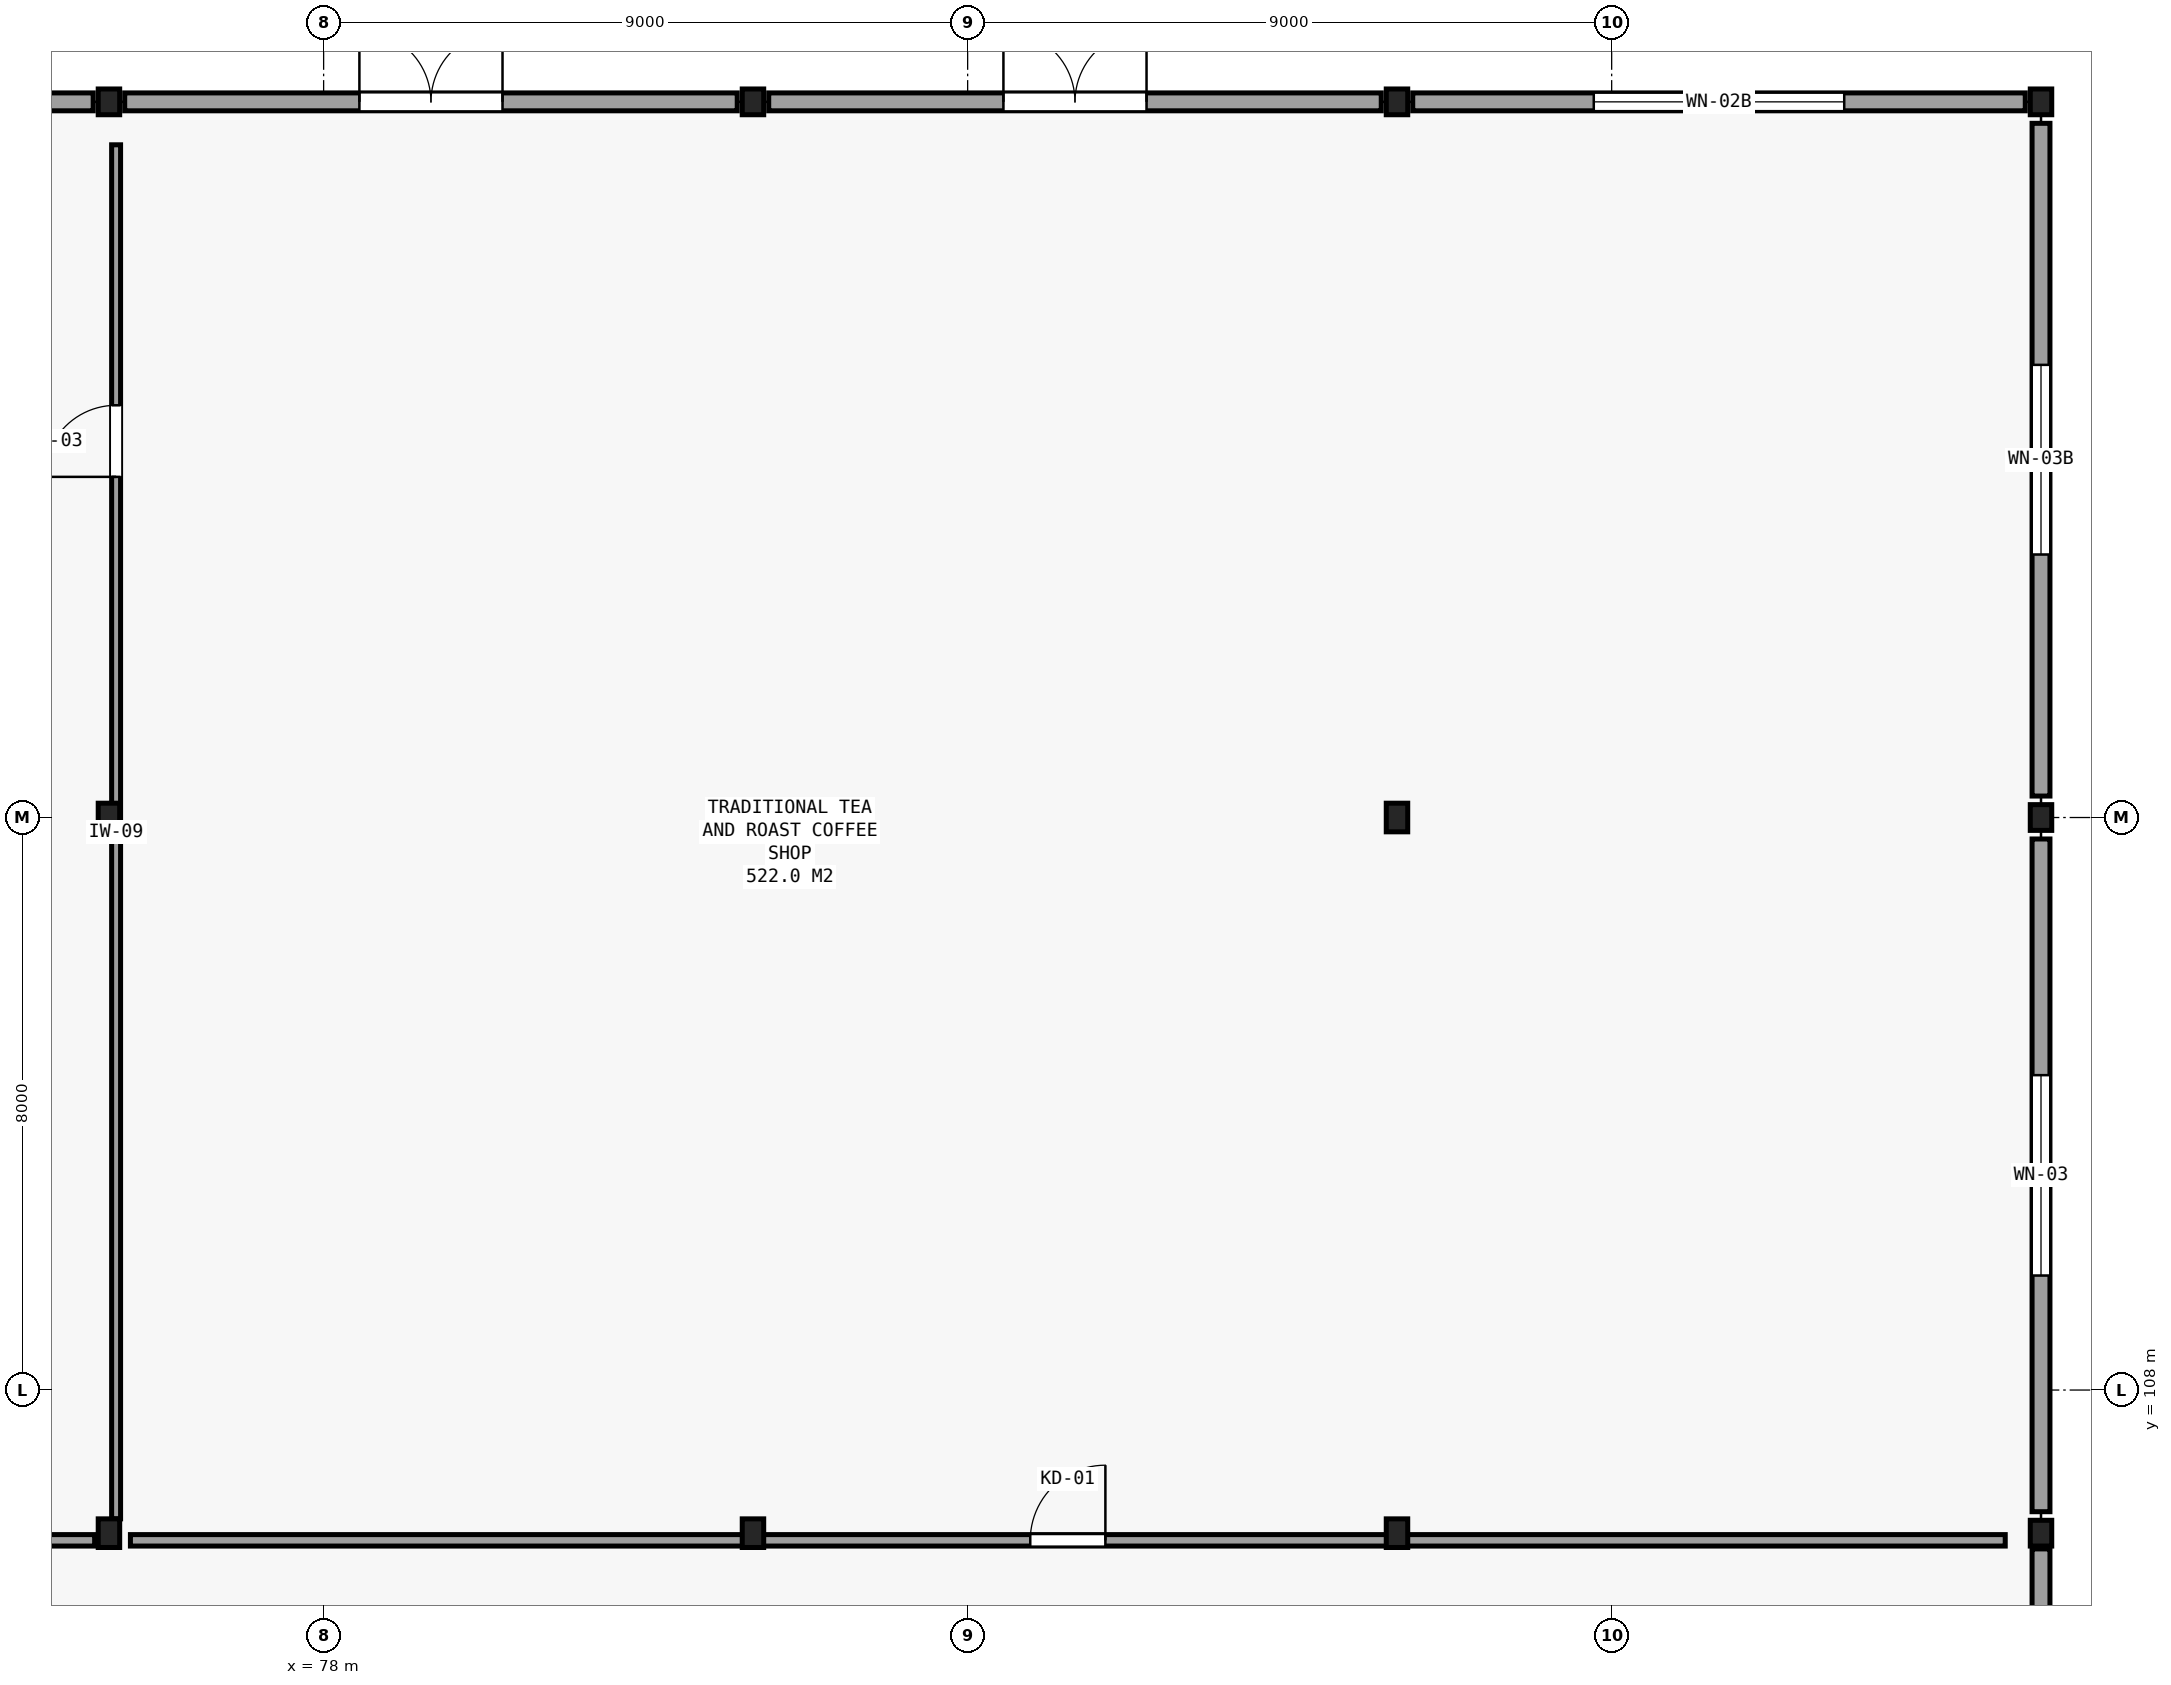
"""IFC4 building model, lengths in metres.
Left out: names, types, materials, properties, quantities, classifications, styles, units other than length and angle.
Written with IfcOpenShell. Run it as: python <this file> out.ifc"""

import sys

from ifc_helpers import new_model, si_unit, direction, frame, frame_2d, origin, origin_2d, place, context, subcontext, project, spatial, rectangle, i_section, extrude, element, fill, save


model = new_model("IFC4")
c1 = context("Model", 3, precision=1e-05, world=origin(), true_north=direction((0.0, 1.0)))
c2 = subcontext(c1, "Body", "Model", "MODEL_VIEW")
j1 = project(units=[si_unit("LENGTHUNIT", "METRE"), si_unit("PLANEANGLEUNIT", "RADIAN")], contexts=[c1])
p1 = place(None, origin())
s1 = spatial("IfcSite", under=j1, at=p1, CompositionType="ELEMENT")
p2 = place(p1, origin())
s2 = spatial("IfcBuilding", under=s1, at=p2, CompositionType="ELEMENT")
p3 = place(p2, origin())
s3 = spatial("IfcBuildingStorey", under=s2, at=p3, CompositionType="ELEMENT", Elevation=0.0)
for number, where, z_axis, x_axis in (
    (1, (75.0, 106.0, 0.0), (0.0, 0.0, 1.0), (1.0, 0.0, 0.0)),
    (2, (75.0, 116.0, 0.0), (0.0, 0.0, 1.0), (1.0, 0.0, 0.0)),
):
    element("IfcColumn", number, at=place(p3, frame(where, z_axis=z_axis, x_axis=x_axis)), inside=s3, PredefinedType="COLUMN", context=c2, shape_type="SweptSolid", body=[
        extrude(i_section(OverallWidth=0.3, OverallDepth=0.4, WebThickness=0.013, FlangeThickness=0.024, FilletRadius=0.027, at=origin_2d()), origin(), (0.0, 0.0, 1.0), 5.4),
    ])
p4 = place(p3, frame((75.0, 126.0, 0.0), z_axis=(0.0, 0.0, 1.0), x_axis=(1.0, 0.0, 0.0)))
e3 = element("IfcColumn", 3, at=p4, inside=s3, PredefinedType="COLUMN", context=c2, shape_type="SweptSolid", body=[
    extrude(i_section(OverallWidth=0.3, OverallDepth=0.36, WebThickness=0.012, FlangeThickness=0.022, FilletRadius=0.027, at=origin_2d()), origin(), (0.0, 0.0, 1.0), 5.4),
])
for number, where, z_axis, x_axis in (
    (4, (84.0, 106.0, 0.0), (0.0, 0.0, 1.0), (1.0, 0.0, 0.0)),
    (5, (84.0, 116.0, 0.0), (0.0, 0.0, 1.0), (1.0, 0.0, 0.0)),
):
    element("IfcColumn", number, at=place(p3, frame(where, z_axis=z_axis, x_axis=x_axis)), inside=s3, PredefinedType="COLUMN", context=c2, shape_type="SweptSolid", body=[
        extrude(i_section(OverallWidth=0.3, OverallDepth=0.4, WebThickness=0.013, FlangeThickness=0.024, FilletRadius=0.027, at=origin_2d()), origin(), (0.0, 0.0, 1.0), 5.4),
    ])
p5 = place(p3, frame((84.0, 126.0, 0.0), z_axis=(0.0, 0.0, 1.0), x_axis=(1.0, 0.0, 0.0)))
e6 = element("IfcColumn", 6, at=p5, inside=s3, PredefinedType="COLUMN", context=c2, shape_type="SweptSolid", body=[
    extrude(i_section(OverallWidth=0.3, OverallDepth=0.36, WebThickness=0.012, FlangeThickness=0.022, FilletRadius=0.027, at=origin_2d()), origin(), (0.0, 0.0, 1.0), 5.4),
])
for number, where, z_axis, x_axis in (
    (7, (93.0, 106.0, 0.0), (0.0, 0.0, 1.0), (1.0, 0.0, 0.0)),
    (8, (93.0, 116.0, 0.0), (0.0, 0.0, 1.0), (1.0, 0.0, 0.0)),
):
    element("IfcColumn", number, at=place(p3, frame(where, z_axis=z_axis, x_axis=x_axis)), inside=s3, PredefinedType="COLUMN", context=c2, shape_type="SweptSolid", body=[
        extrude(i_section(OverallWidth=0.3, OverallDepth=0.4, WebThickness=0.013, FlangeThickness=0.024, FilletRadius=0.027, at=origin_2d()), origin(), (0.0, 0.0, 1.0), 5.4),
    ])
for number, where, z_axis, x_axis in (
    (9, (93.0, 126.0, 0.0), (0.0, 0.0, 1.0), (1.0, 0.0, 0.0)),
    (10, (102.0, 106.0, 0.0), (0.0, 0.0, 1.0), (1.0, 0.0, 0.0)),
    (11, (102.0, 116.0, 0.0), (0.0, 0.0, 1.0), (1.0, 0.0, 0.0)),
    (12, (102.0, 126.0, 0.0), (0.0, 0.0, 1.0), (1.0, 0.0, 0.0)),
):
    element("IfcColumn", number, at=place(p3, frame(where, z_axis=z_axis, x_axis=x_axis)), inside=s3, PredefinedType="COLUMN", context=c2, shape_type="SweptSolid", body=[
        extrude(i_section(OverallWidth=0.3, OverallDepth=0.36, WebThickness=0.012, FlangeThickness=0.022, FilletRadius=0.027, at=origin_2d()), origin(), (0.0, 0.0, 1.0), 5.4),
    ])
p6 = place(p3, frame((66.22, 126.0, 0.0), z_axis=(0.0, 0.0, 1.0), x_axis=(1.0, 0.0, 0.0)))
e13 = element("IfcWall", 13, at=p6, inside=s3, PredefinedType="SOLIDWALL", context=c2, shape_type="SweptSolid", body=[
    extrude(rectangle(XDim=8.56, YDim=0.25, at=frame_2d((4.28, 0.0))), origin(), (0.0, 0.0, 1.0), 4.61),
])
p7 = place(p6, frame((2.68, 0.0, 0.9)))
e14 = element("IfcOpeningElement", 14, at=p7, cuts=e13, PredefinedType="OPENING", context=c2, shape_type="SweptSolid", body=[
    extrude(rectangle(XDim=3.2, YDim=2.2, at=frame_2d((1.6, 1.1))), frame((0.0, 0.135, 0.0), z_axis=(0.0, -1.0, 0.0), x_axis=(1.0, 0.0, 0.0)), (0.0, 0.0, 1.0), 0.27),
])
p8 = place(p3, frame((75.22, 126.0, 0.0), z_axis=(0.0, 0.0, 1.0), x_axis=(1.0, 0.0, 0.0)))
e15 = element("IfcWall", 15, at=p8, inside=s3, PredefinedType="SOLIDWALL", context=c2, shape_type="SweptSolid", body=[
    extrude(rectangle(XDim=8.56, YDim=0.25, at=frame_2d((4.28, 0.0))), origin(), (0.0, 0.0, 1.0), 4.61),
])
p9 = place(p8, frame((3.28, 0.0, 0.0)))
e16 = element("IfcOpeningElement", 16, at=p9, cuts=e15, PredefinedType="OPENING", context=c2, shape_type="SweptSolid", body=[
    extrude(rectangle(XDim=2.0, YDim=2.3, at=frame_2d((1.0, 1.15))), frame((0.0, 0.135, 0.0), z_axis=(0.0, -1.0, 0.0), x_axis=(1.0, 0.0, 0.0)), (0.0, 0.0, 1.0), 0.27),
])
p10 = place(p3, frame((84.22, 126.0, 0.0), z_axis=(0.0, 0.0, 1.0), x_axis=(1.0, 0.0, 0.0)))
e17 = element("IfcWall", 17, at=p10, inside=s3, PredefinedType="SOLIDWALL", context=c2, shape_type="SweptSolid", body=[
    extrude(rectangle(XDim=8.56, YDim=0.25, at=frame_2d((4.28, 0.0))), origin(), (0.0, 0.0, 1.0), 4.61),
])
p11 = place(p10, frame((3.28, 0.0, 0.0)))
e18 = element("IfcOpeningElement", 18, at=p11, cuts=e17, PredefinedType="OPENING", context=c2, shape_type="SweptSolid", body=[
    extrude(rectangle(XDim=2.0, YDim=2.3, at=frame_2d((1.0, 1.15))), frame((0.0, 0.135, 0.0), z_axis=(0.0, -1.0, 0.0), x_axis=(1.0, 0.0, 0.0)), (0.0, 0.0, 1.0), 0.27),
])
p12 = place(p3, frame((93.22, 126.0, 0.0), z_axis=(0.0, 0.0, 1.0), x_axis=(1.0, 0.0, 0.0)))
e19 = element("IfcWall", 19, at=p12, inside=s3, PredefinedType="SOLIDWALL", context=c2, shape_type="SweptSolid", body=[
    extrude(rectangle(XDim=8.56, YDim=0.25, at=frame_2d((4.28, 0.0))), origin(), (0.0, 0.0, 1.0), 4.61),
])
p13 = place(p12, frame((2.53, 0.0, 0.9)))
e20 = element("IfcOpeningElement", 20, at=p13, cuts=e19, PredefinedType="OPENING", context=c2, shape_type="SweptSolid", body=[
    extrude(rectangle(XDim=3.5, YDim=2.25, at=frame_2d((1.75, 1.125))), frame((0.0, 0.135, 0.0), z_axis=(0.0, -1.0, 0.0), x_axis=(1.0, 0.0, 0.0)), (0.0, 0.0, 1.0), 0.27),
])
p14 = place(p3, frame((102.0, 105.78, 0.0), z_axis=(0.0, 0.0, 1.0), x_axis=(0.0, -1.0, 0.0)))
e21 = element("IfcWall", 21, at=p14, inside=s3, PredefinedType="SOLIDWALL", context=c2, shape_type="SweptSolid", body=[
    extrude(rectangle(XDim=9.56, YDim=0.25, at=frame_2d((4.78, 0.0))), origin(), (0.0, 0.0, 1.0), 4.71),
])
p15 = place(p14, frame((3.18, 0.0, 0.9)))
e22 = element("IfcOpeningElement", 22, at=p15, cuts=e21, PredefinedType="OPENING", context=c2, shape_type="SweptSolid", body=[
    extrude(rectangle(XDim=3.2, YDim=2.2, at=frame_2d((1.6, 1.1))), frame((0.0, 0.135, 0.0), z_axis=(0.0, -1.0, 0.0), x_axis=(1.0, 0.0, 0.0)), (0.0, 0.0, 1.0), 0.27),
])
p16 = place(p3, frame((102.0, 115.7, 0.0), z_axis=(0.0, 0.0, 1.0), x_axis=(0.0, -1.0, 0.0)))
e23 = element("IfcWall", 23, at=p16, inside=s3, PredefinedType="SOLIDWALL", context=c2, shape_type="SweptSolid", body=[
    extrude(rectangle(XDim=9.4, YDim=0.25, at=frame_2d((4.7, 0.0))), origin(), (0.0, 0.0, 1.0), 4.71),
])
p17 = place(p16, frame((3.3, 0.0, 0.9)))
e24 = element("IfcOpeningElement", 24, at=p17, cuts=e23, PredefinedType="OPENING", context=c2, shape_type="SweptSolid", body=[
    extrude(rectangle(XDim=2.8, YDim=2.1, at=frame_2d((1.4, 1.05))), frame((0.0, 0.135, 0.0), z_axis=(0.0, -1.0, 0.0), x_axis=(1.0, 0.0, 0.0)), (0.0, 0.0, 1.0), 0.27),
])
p18 = place(p3, frame((102.0, 125.7, 0.0), z_axis=(0.0, 0.0, 1.0), x_axis=(0.0, -1.0, 0.0)))
e25 = element("IfcWall", 25, at=p18, inside=s3, PredefinedType="SOLIDWALL", context=c2, shape_type="SweptSolid", body=[
    extrude(rectangle(XDim=9.4, YDim=0.25, at=frame_2d((4.7, 0.0))), origin(), (0.0, 0.0, 1.0), 4.71),
])
p19 = place(p18, frame((3.375, 0.0, 0.9)))
e26 = element("IfcOpeningElement", 26, at=p19, cuts=e25, PredefinedType="OPENING", context=c2, shape_type="SweptSolid", body=[
    extrude(rectangle(XDim=2.65, YDim=2.05, at=frame_2d((1.325, 1.025))), frame((0.0, 0.135, 0.0), z_axis=(0.0, -1.0, 0.0), x_axis=(1.0, 0.0, 0.0)), (0.0, 0.0, 1.0), 0.27),
])
p20 = place(p3, frame((48.3, 105.9, 0.0), z_axis=(0.0, 0.0, 1.0), x_axis=(1.0, 0.0, 0.0)))
e27 = element("IfcWall", 27, at=p20, inside=s3, PredefinedType="PARTITIONING", context=c2, shape_type="SweptSolid", body=[
    extrude(rectangle(XDim=26.5, YDim=0.16, at=frame_2d((13.25, 0.0))), origin(), (0.0, 0.0, 1.0), 4.61),
])
p21 = place(p20, frame((12.725, 0.0, 0.0)))
e28 = element("IfcOpeningElement", 28, at=p21, cuts=e27, PredefinedType="OPENING", context=c2, shape_type="SweptSolid", body=[
    extrude(rectangle(XDim=1.05, YDim=2.15, at=frame_2d((0.525, 1.075))), frame((0.0, 0.09, 0.0), z_axis=(0.0, -1.0, 0.0), x_axis=(1.0, 0.0, 0.0)), (0.0, 0.0, 1.0), 0.18),
])
p22 = place(p3, frame((75.3, 105.9, 0.0), z_axis=(0.0, 0.0, 1.0), x_axis=(1.0, 0.0, 0.0)))
e29 = element("IfcWall", 29, at=p22, inside=s3, PredefinedType="PARTITIONING", context=c2, shape_type="SweptSolid", body=[
    extrude(rectangle(XDim=26.2, YDim=0.16, at=frame_2d((13.1, 0.0))), origin(), (0.0, 0.0, 1.0), 4.61),
])
p23 = place(p22, frame((12.575, 0.0, 0.0)))
e30 = element("IfcOpeningElement", 30, at=p23, cuts=e29, PredefinedType="OPENING", context=c2, shape_type="SweptSolid", body=[
    extrude(rectangle(XDim=1.05, YDim=2.15, at=frame_2d((0.525, 1.075))), frame((0.0, 0.09, 0.0), z_axis=(0.0, -1.0, 0.0), x_axis=(1.0, 0.0, 0.0)), (0.0, 0.0, 1.0), 0.18),
])
p24 = place(p3, frame((75.1, 106.2, 0.0), z_axis=(0.0, 0.0, 1.0), x_axis=(0.0, 1.0, 0.0)))
e31 = element("IfcWall", 31, at=p24, inside=s3, PredefinedType="PARTITIONING", context=c2, shape_type="SweptSolid", body=[
    extrude(rectangle(XDim=19.2, YDim=0.125, at=frame_2d((9.6, 0.0))), origin(), (0.0, 0.0, 1.0), 4.71),
])
p25 = place(p24, frame((14.56, 0.0, 0.0)))
e32 = element("IfcOpeningElement", 32, at=p25, cuts=e31, PredefinedType="OPENING", context=c2, shape_type="SweptSolid", body=[
    extrude(rectangle(XDim=1.0, YDim=2.15, at=frame_2d((0.5, 1.075))), frame((0.0, 0.073, 0.0), z_axis=(0.0, -1.0, 0.0), x_axis=(1.0, 0.0, 0.0)), (0.0, 0.0, 1.0), 0.145),
])
p26 = place(p9, origin())
e33 = element("IfcDoor", 33, at=p26, inside=s3, OperationType="DOUBLE_DOOR_SINGLE_SWING", PredefinedType="DOOR", context=c2, shape_type="SweptSolid", body=[
    extrude(rectangle(XDim=2.0, YDim=2.3, at=frame_2d((1.0, 1.15))), frame((0.0, 0.025, 0.0), z_axis=(0.0, -1.0, 0.0), x_axis=(1.0, 0.0, 0.0)), (0.0, 0.0, 1.0), 0.05),
])
fill(e16, e33)
p27 = place(p11, origin())
e34 = element("IfcDoor", 34, at=p27, inside=s3, OperationType="DOUBLE_DOOR_SINGLE_SWING", PredefinedType="DOOR", context=c2, shape_type="SweptSolid", body=[
    extrude(rectangle(XDim=2.0, YDim=2.3, at=frame_2d((1.0, 1.15))), frame((0.0, 0.025, 0.0), z_axis=(0.0, -1.0, 0.0), x_axis=(1.0, 0.0, 0.0)), (0.0, 0.0, 1.0), 0.05),
])
fill(e18, e34)
p28 = place(p13, origin())
e35 = element("IfcWindow", 35, at=p28, inside=s3, PartitioningType="SINGLE_PANEL", PredefinedType="WINDOW", context=c2, shape_type="SweptSolid", body=[
    extrude(rectangle(XDim=3.5, YDim=2.25, at=frame_2d((1.75, 1.125))), frame((0.0, 0.03, 0.0), z_axis=(0.0, -1.0, 0.0), x_axis=(1.0, 0.0, 0.0)), (0.0, 0.0, 1.0), 0.06),
])
fill(e20, e35)
p29 = place(p17, origin())
e36 = element("IfcWindow", 36, at=p29, inside=s3, PartitioningType="SINGLE_PANEL", PredefinedType="WINDOW", context=c2, shape_type="SweptSolid", body=[
    extrude(rectangle(XDim=2.8, YDim=2.1, at=frame_2d((1.4, 1.05))), frame((0.0, 0.03, 0.0), z_axis=(0.0, -1.0, 0.0), x_axis=(1.0, 0.0, 0.0)), (0.0, 0.0, 1.0), 0.06),
])
fill(e24, e36)
p30 = place(p19, origin())
e37 = element("IfcWindow", 37, at=p30, inside=s3, PartitioningType="SINGLE_PANEL", PredefinedType="WINDOW", context=c2, shape_type="SweptSolid", body=[
    extrude(rectangle(XDim=2.65, YDim=2.05, at=frame_2d((1.325, 1.025))), frame((0.0, 0.03, 0.0), z_axis=(0.0, -1.0, 0.0), x_axis=(1.0, 0.0, 0.0)), (0.0, 0.0, 1.0), 0.06),
])
fill(e26, e37)
p31 = place(p23, origin())
e38 = element("IfcDoor", 38, at=p31, inside=s3, OperationType="SINGLE_SWING_RIGHT", PredefinedType="DOOR", context=c2, shape_type="SweptSolid", body=[
    extrude(rectangle(XDim=1.05, YDim=2.15, at=frame_2d((0.525, 1.075))), frame((0.0, 0.025, 0.0), z_axis=(0.0, -1.0, 0.0), x_axis=(1.0, 0.0, 0.0)), (0.0, 0.0, 1.0), 0.05),
])
fill(e30, e38)
p32 = place(p25, origin())
e39 = element("IfcDoor", 39, at=p32, inside=s3, OperationType="SINGLE_SWING_LEFT", PredefinedType="DOOR", context=c2, shape_type="SweptSolid", body=[
    extrude(rectangle(XDim=1.0, YDim=2.15, at=frame_2d((0.5, 1.075))), frame((0.0, 0.025, 0.0), z_axis=(0.0, -1.0, 0.0), x_axis=(1.0, 0.0, 0.0)), (0.0, 0.0, 1.0), 0.05),
])
fill(e32, e39)
save(model, sys.argv[1])
